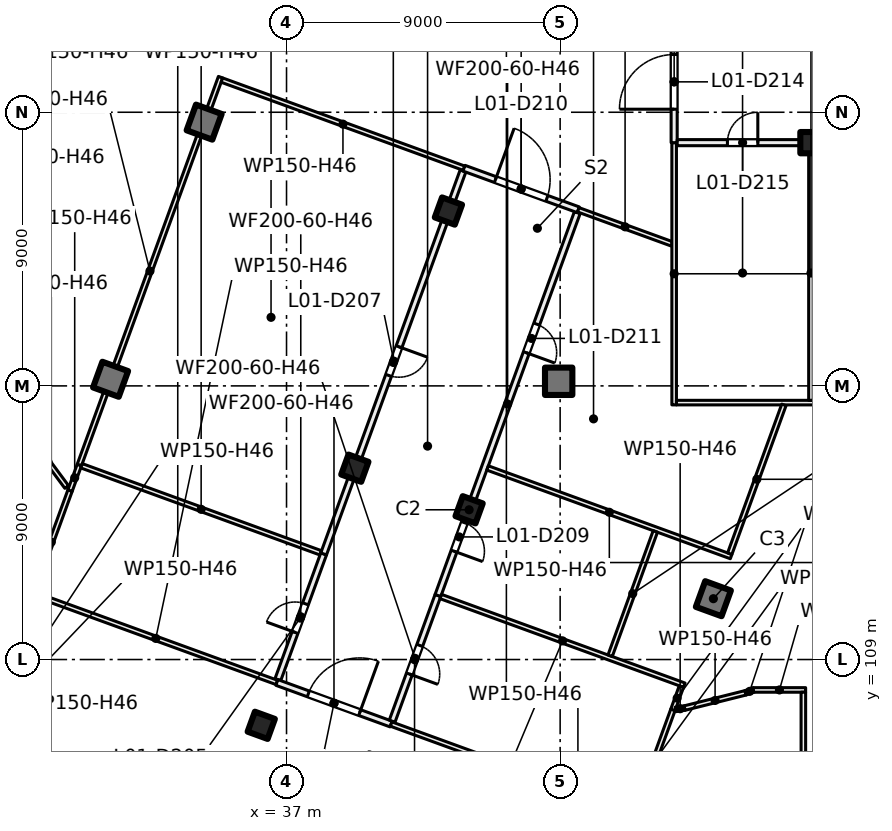
"""IFC4 building model, lengths in metres.
Left out: names, types, materials, properties, quantities, classifications, styles, units other than length and angle.
Written with IfcOpenShell. Run it as: python <this file> out.ifc"""

import sys

from ifc_helpers import new_model, si_unit, direction, frame, frame_2d, origin, origin_2d, place, context, subcontext, project, spatial, rectangle, extrude, element, fill, save


model = new_model("IFC4")
c1 = context("Model", 3, precision=1e-05, world=origin(), true_north=direction((0.0, 1.0)))
c2 = subcontext(c1, "Body", "Model", "MODEL_VIEW")
j1 = project(units=[si_unit("LENGTHUNIT", "METRE"), si_unit("PLANEANGLEUNIT", "RADIAN")], contexts=[c1])
p1 = place(None, origin())
s1 = spatial("IfcSite", under=j1, at=p1, CompositionType="ELEMENT")
p2 = place(p1, origin())
s2 = spatial("IfcBuilding", under=s1, at=p2, CompositionType="ELEMENT")
p3 = place(p2, frame((0.0, 0.0, 7.5)))
s3 = spatial("IfcBuildingStorey", under=s2, at=p3, CompositionType="ELEMENT", Elevation=7.5)
p4 = place(p3, frame((54.25, 126.0, 0.0), z_axis=(0.0, 0.0, 1.0), x_axis=(1.0, 0.0, 0.0)))
e1 = element("IfcColumn", 1, at=p4, inside=s3, PredefinedType="COLUMN", context=c2, shape_type="SweptSolid", body=[
    extrude(rectangle(XDim=0.7, YDim=0.7, at=origin_2d()), origin(), (0.0, 0.0, 1.0), 5.0),
])
p5 = place(p3, frame((45.952, 118.152, 0.0), z_axis=(0.0, 0.0, 1.0), x_axis=(1.0, 0.0, 0.0)))
e2 = element("IfcColumn", 2, at=p5, inside=s3, PredefinedType="COLUMN", context=c2, shape_type="SweptSolid", body=[
    extrude(rectangle(XDim=0.9, YDim=0.9, at=origin_2d()), origin(), (0.0, 0.0, 1.0), 5.0),
])
for number, where, z_axis, x_axis in (
    (3, (43.006, 113.925, 0.0), (0.0, 0.0, 1.0), (-0.342, -0.94, 0.0)),
    (4, (42.325, 123.751, 0.0), (0.0, 0.0, 1.0), (-0.342, -0.94, 0.0)),
    (5, (39.247, 115.293, 0.0), (0.0, 0.0, 1.0), (-0.342, -0.94, 0.0)),
    (6, (36.169, 106.836, 0.0), (0.0, 0.0, 1.0), (-0.342, -0.94, 0.0)),
):
    element("IfcColumn", number, at=place(p3, frame(where, z_axis=z_axis, x_axis=x_axis)), inside=s3, PredefinedType="COLUMN", context=c2, shape_type="SweptSolid", body=[
        extrude(rectangle(XDim=0.7, YDim=0.7, at=origin_2d()), origin(), (0.0, 0.0, 1.0), 5.0),
    ])
for number, where, z_axis, x_axis in (
    (7, (51.04, 111.001, 0.0), (0.0, 0.0, 1.0), (-0.342, -0.94, 0.0)),
    (8, (34.291, 126.675, 0.0), (0.0, 0.0, 1.0), (-0.342, -0.94, 0.0)),
    (9, (31.212, 118.218, 0.0), (0.0, 0.0, 1.0), (-0.342, -0.94, 0.0)),
):
    element("IfcColumn", number, at=place(p3, frame(where, z_axis=z_axis, x_axis=x_axis)), inside=s3, PredefinedType="COLUMN", context=c2, shape_type="SweptSolid", body=[
        extrude(rectangle(XDim=0.9, YDim=0.9, at=origin_2d()), origin(), (0.0, 0.0, 1.0), 5.0),
    ])
p6 = place(p2, origin())
s4 = spatial("IfcBuildingStorey", under=s2, at=p6, CompositionType="ELEMENT", Elevation=0.0)
p7 = place(p6, frame((54.0, 94.428, 0.0), z_axis=(0.0, 0.0, 1.0), x_axis=(0.342028064794, 0.939689737569, 0.0)))
e10 = element("IfcWall", 10, at=p7, inside=s4, PredefinedType="PARTITIONING", context=c2, shape_type="SweptSolid", body=[
    extrude(rectangle(XDim=14.443, YDim=0.3, at=frame_2d((7.222, 0.0))), origin(), (0.0, 0.0, 1.0), 11.1),
])
p8 = place(p3, frame((28.537, 116.336, 0.0), z_axis=(0.0, 0.0, 1.0), x_axis=(0.595741297031, -0.80317638599, 0.0)))
e11 = element("IfcWall", 11, at=p8, inside=s3, PredefinedType="PARTITIONING", context=c2, shape_type="SweptSolid", body=[
    extrude(rectangle(XDim=2.068, YDim=0.15, at=frame_2d((1.034, 0.0))), origin(), (0.0, 0.0, 1.0), 4.6),
])
p9 = place(p3, frame((28.647, 111.17, 0.0), z_axis=(0.0, 0.0, 1.0), x_axis=(0.341993373756, 0.939702363681, 0.0)))
e12 = element("IfcWall", 12, at=p9, inside=s3, PredefinedType="PARTITIONING", context=c2, shape_type="SweptSolid", body=[
    extrude(rectangle(XDim=3.602, YDim=0.15, at=frame_2d((1.801, 0.0))), origin(), (0.0, 0.0, 1.0), 4.6),
])
p10 = place(p3, frame((28.717, 111.144, 0.0), z_axis=(0.0, 0.0, 1.0), x_axis=(0.939731172492, -0.341914204803, 0.0)))
e13 = element("IfcWall", 13, at=p10, inside=s3, PredefinedType="PARTITIONING", context=c2, shape_type="SweptSolid", body=[
    extrude(rectangle(XDim=8.476, YDim=0.15, at=frame_2d((4.238, 0.0))), origin(), (0.0, 0.0, 1.0), 4.6),
])
p11 = place(p3, frame((29.879, 114.555, 0.0), z_axis=(0.0, 0.0, 1.0), x_axis=(0.341961311006, 0.939714031914, 0.0)))
e14 = element("IfcWall", 14, at=p11, inside=s3, PredefinedType="PARTITIONING", context=c2, shape_type="SweptSolid", body=[
    extrude(rectangle(XDim=0.898, YDim=0.15, at=frame_2d((0.449, 0.0))), origin(), (0.0, 0.0, 1.0), 4.6),
])
p12 = place(p3, frame((30.186, 115.399, 0.0), z_axis=(0.0, 0.0, 1.0), x_axis=(0.342121388632, 0.939655764331, 0.0)))
e15 = element("IfcWall", 15, at=p12, inside=s3, PredefinedType="PARTITIONING", context=c2, shape_type="SweptSolid", body=[
    extrude(rectangle(XDim=13.574, YDim=0.15, at=frame_2d((6.787, 0.0))), origin(), (0.0, 0.0, 1.0), 4.6),
])
p13 = place(p3, frame((30.256, 115.373, 0.0), z_axis=(0.0, 0.0, 1.0), x_axis=(0.939683593483, -0.342044944618, 0.0)))
e16 = element("IfcWall", 16, at=p13, inside=s3, PredefinedType="PARTITIONING", context=c2, shape_type="SweptSolid", body=[
    extrude(rectangle(XDim=8.376, YDim=0.15, at=frame_2d((4.188, 0.0))), origin(), (0.0, 0.0, 1.0), 4.6),
])
p14 = place(p3, frame((34.874, 128.058, 0.0), z_axis=(0.0, 0.0, 1.0), x_axis=(0.939708443164, -0.341976668571, 0.0)))
e17 = element("IfcWall", 17, at=p14, inside=s3, PredefinedType="PARTITIONING", context=c2, shape_type="SweptSolid", body=[
    extrude(rectangle(XDim=8.475, YDim=0.15, at=frame_2d((4.237, 0.0))), origin(), (0.0, 0.0, 1.0), 4.6),
])
p15 = place(p3, frame((36.716, 108.34, 0.0), z_axis=(0.0, 0.0, 1.0), x_axis=(0.342063854115, 0.939676710208, 0.0)))
e18 = element("IfcWall", 18, at=p15, inside=s3, PredefinedType="PARTITIONING", context=c2, shape_type="SweptSolid", body=[
    extrude(rectangle(XDim=4.399, YDim=0.2, at=frame_2d((2.2, 0.0))), origin(), (0.0, 0.0, 1.0), 4.6),
])
p16 = place(p15, frame((1.652, 0.0, 0.0)))
e19 = element("IfcOpeningElement", 19, at=p16, cuts=e18, PredefinedType="OPENING", context=c2, shape_type="SweptSolid", body=[
    extrude(rectangle(XDim=1.0, YDim=2.1, at=frame_2d((0.5, 1.05))), frame((0.0, 0.11, 0.0), z_axis=(0.0, -1.0, 0.0), x_axis=(1.0, 0.0, 0.0)), (0.0, 0.0, 1.0), 0.22),
])
p17 = place(p3, frame((40.44, 106.878, 0.0), z_axis=(0.0, 0.0, 1.0), x_axis=(-0.939665029144, 0.342095941228, 0.0)))
e20 = element("IfcWall", 20, at=p17, inside=s3, PredefinedType="PARTITIONING", context=c2, shape_type="SweptSolid", body=[
    extrude(rectangle(XDim=3.999, YDim=0.2, at=frame_2d((2.0, 0.0))), origin(), (0.0, 0.0, 1.0), 4.6),
])
p18 = place(p17, frame((1.099, 0.0, 0.0)))
e21 = element("IfcOpeningElement", 21, at=p18, cuts=e20, PredefinedType="OPENING", context=c2, shape_type="SweptSolid", body=[
    extrude(rectangle(XDim=1.8, YDim=2.1, at=frame_2d((0.9, 1.05))), frame((0.0, 0.11, 0.0), z_axis=(0.0, -1.0, 0.0), x_axis=(1.0, 0.0, 0.0)), (0.0, 0.0, 1.0), 0.22),
])
p19 = place(p3, frame((38.221, 112.474, 0.0), z_axis=(0.0, 0.0, 1.0), x_axis=(0.342018071111, 0.939693375008, 0.0)))
e22 = element("IfcWall", 22, at=p19, inside=s3, PredefinedType="PARTITIONING", context=c2, shape_type="SweptSolid", body=[
    extrude(rectangle(XDim=13.4, YDim=0.2, at=frame_2d((6.7, 0.0))), origin(), (0.0, 0.0, 1.0), 4.6),
])
p20 = place(p19, frame((6.248, 0.0, 0.0)))
e23 = element("IfcOpeningElement", 23, at=p20, cuts=e22, PredefinedType="OPENING", context=c2, shape_type="SweptSolid", body=[
    extrude(rectangle(XDim=1.0, YDim=2.1, at=frame_2d((0.5, 1.05))), frame((0.0, 0.11, 0.0), z_axis=(0.0, -1.0, 0.0), x_axis=(1.0, 0.0, 0.0)), (0.0, 0.0, 1.0), 0.22),
])
p21 = place(p3, frame((41.98, 111.106, 0.0), z_axis=(0.0, 0.0, 1.0), x_axis=(-0.342259834227, -0.93960534581, 0.0)))
e24 = element("IfcWall", 24, at=p21, inside=s3, PredefinedType="PARTITIONING", context=c2, shape_type="SweptSolid", body=[
    extrude(rectangle(XDim=4.4, YDim=0.2, at=frame_2d((2.2, 0.0))), origin(), (0.0, 0.0, 1.0), 4.6),
])
p22 = place(p21, frame((1.748, 0.0, 0.0)))
e25 = element("IfcOpeningElement", 25, at=p22, cuts=e24, PredefinedType="OPENING", context=c2, shape_type="SweptSolid", body=[
    extrude(rectangle(XDim=1.0, YDim=2.1, at=frame_2d((0.5, 1.05))), frame((0.0, 0.11, 0.0), z_axis=(0.0, -1.0, 0.0), x_axis=(1.0, 0.0, 0.0)), (0.0, 0.0, 1.0), 0.22),
])
p23 = place(p3, frame((40.44, 106.878, 0.0), z_axis=(0.0, 0.0, 1.0), x_axis=(0.939697516706, -0.342006691597, 0.0)))
e26 = element("IfcWall", 26, at=p23, inside=s3, PredefinedType="PARTITIONING", context=c2, shape_type="SweptSolid", body=[
    extrude(rectangle(XDim=8.476, YDim=0.15, at=frame_2d((4.238, 0.0))), origin(), (0.0, 0.0, 1.0), 4.6),
])
p24 = place(p3, frame((46.563, 123.698, 0.0), z_axis=(0.0, 0.0, 1.0), x_axis=(-0.342012215574, -0.939695506214, 0.0)))
e27 = element("IfcWall", 27, at=p24, inside=s3, PredefinedType="PARTITIONING", context=c2, shape_type="SweptSolid", body=[
    extrude(rectangle(XDim=13.4, YDim=0.2, at=frame_2d((6.7, 0.0))), origin(), (0.0, 0.0, 1.0), 4.6),
])
p25 = place(p24, frame((10.85, 0.0, 0.0)))
e28 = element("IfcOpeningElement", 28, at=p25, cuts=e27, PredefinedType="OPENING", context=c2, shape_type="SweptSolid", body=[
    extrude(rectangle(XDim=1.0, YDim=2.1, at=frame_2d((0.5, 1.05))), frame((0.0, 0.11, 0.0), z_axis=(0.0, -1.0, 0.0), x_axis=(1.0, 0.0, 0.0)), (0.0, 0.0, 1.0), 0.22),
])
p26 = place(p24, frame((3.902, 0.0, 0.0)))
e29 = element("IfcOpeningElement", 29, at=p26, cuts=e27, PredefinedType="OPENING", context=c2, shape_type="SweptSolid", body=[
    extrude(rectangle(XDim=1.0, YDim=2.1, at=frame_2d((0.5, 1.05))), frame((0.0, 0.11, 0.0), z_axis=(0.0, -1.0, 0.0), x_axis=(1.0, 0.0, 0.0)), (0.0, 0.0, 1.0), 0.22),
])
p27 = place(p3, frame((42.074, 111.072, 0.0), z_axis=(0.0, 0.0, 1.0), x_axis=(0.939669601, -0.342083383046, 0.0)))
e30 = element("IfcWall", 30, at=p27, inside=s3, PredefinedType="PARTITIONING", context=c2, shape_type="SweptSolid", body=[
    extrude(rectangle(XDim=8.524, YDim=0.15, at=frame_2d((4.262, 0.0))), origin(), (0.0, 0.0, 1.0), 4.6),
])
p28 = place(p3, frame((42.838, 125.16, 0.0), z_axis=(0.0, 0.0, 1.0), x_axis=(0.939713209288, -0.341963571582, 0.0)))
e31 = element("IfcWall", 31, at=p28, inside=s3, PredefinedType="PARTITIONING", context=c2, shape_type="SweptSolid", body=[
    extrude(rectangle(XDim=4.0, YDim=0.2, at=frame_2d((2.0, 0.0))), origin(), (0.0, 0.0, 1.0), 4.6),
])
p29 = place(p28, frame((1.1, 0.0, 0.0)))
e32 = element("IfcOpeningElement", 32, at=p29, cuts=e31, PredefinedType="OPENING", context=c2, shape_type="SweptSolid", body=[
    extrude(rectangle(XDim=1.8, YDim=2.1, at=frame_2d((0.9, 1.05))), frame((0.0, 0.11, 0.0), z_axis=(0.0, -1.0, 0.0), x_axis=(1.0, 0.0, 0.0)), (0.0, 0.0, 1.0), 0.22),
])
p30 = place(p3, frame((43.613, 115.301, 0.0), z_axis=(0.0, 0.0, 1.0), x_axis=(0.939669601, -0.342083383046, 0.0)))
e33 = element("IfcWall", 33, at=p30, inside=s3, PredefinedType="PARTITIONING", context=c2, shape_type="SweptSolid", body=[
    extrude(rectangle(XDim=8.524, YDim=0.15, at=frame_2d((4.262, 0.0))), origin(), (0.0, 0.0, 1.0), 4.6),
])
p31 = place(p3, frame((46.597, 123.792, 0.0), z_axis=(0.0, 0.0, 1.0), x_axis=(0.939619227089, -0.342221723572, 0.0)))
e34 = element("IfcWall", 34, at=p31, inside=s3, PredefinedType="PARTITIONING", context=c2, shape_type="SweptSolid", body=[
    extrude(rectangle(XDim=3.276, YDim=0.15, at=frame_2d((1.638, 0.0))), origin(), (0.0, 0.0, 1.0), 4.6),
])
p32 = place(p3, frame((47.644, 109.124, 0.0), z_axis=(0.0, 0.0, 1.0), x_axis=(0.341783611499, 0.939778677621, 0.0)))
e35 = element("IfcWall", 35, at=p32, inside=s3, PredefinedType="PARTITIONING", context=c2, shape_type="SweptSolid", body=[
    extrude(rectangle(XDim=4.351, YDim=0.15, at=frame_2d((2.175, 0.0))), origin(), (0.0, 0.0, 1.0), 4.6),
])
p33 = place(p3, frame((48.475, 103.953, 0.0), z_axis=(0.0, 0.0, 1.0), x_axis=(0.341992779494, 0.939702579955, 0.0)))
e36 = element("IfcWall", 36, at=p33, inside=s3, PredefinedType="PARTITIONING", context=c2, shape_type="SweptSolid", body=[
    extrude(rectangle(XDim=3.611, YDim=0.15, at=frame_2d((1.805, 0.0))), origin(), (0.0, 0.0, 1.0), 4.6),
])
p34 = place(p3, frame((49.71, 107.346, 0.0), z_axis=(0.0, 0.0, 1.0), x_axis=(0.341189816469, 0.939994419737, 0.0)))
e37 = element("IfcWall", 37, at=p34, inside=s3, PredefinedType="PARTITIONING", context=c2, shape_type="SweptSolid", body=[
    extrude(rectangle(XDim=0.815, YDim=0.15, at=frame_2d((0.407, 0.0))), origin(), (0.0, 0.0, 1.0), 4.6),
])
p35 = place(p3, frame((49.794, 107.359, 0.0), z_axis=(0.0, 0.0, 1.0), x_axis=(0.988901730308, 0.148571086668, 0.0)))
e38 = element("IfcWall", 38, at=p35, inside=s3, PredefinedType="PARTITIONING", context=c2, shape_type="SweptSolid", body=[
    extrude(rectangle(XDim=0.311, YDim=0.15, at=frame_2d((0.155, 0.0))), origin(), (0.0, 0.0, 1.0), 4.6),
])
p36 = place(p3, frame((49.75, 117.375, 0.0), z_axis=(0.0, 0.0, 1.0), x_axis=(0.0, 1.0, 0.0)))
e39 = element("IfcWall", 39, at=p36, inside=s3, PredefinedType="PARTITIONING", context=c2, shape_type="SweptSolid", body=[
    extrude(rectangle(XDim=8.625, YDim=0.15, at=frame_2d((4.312, 0.0))), origin(), (0.0, 0.0, 1.0), 4.6),
])
p37 = place(p3, frame((91.0, 117.45, 0.0), z_axis=(0.0, 0.0, 1.0), x_axis=(-1.0, 0.0, 0.0)))
e40 = element("IfcWall", 40, at=p37, inside=s3, PredefinedType="PARTITIONING", context=c2, shape_type="SweptSolid", body=[
    extrude(rectangle(XDim=41.175, YDim=0.15, at=frame_2d((20.587, 0.0))), origin(), (0.0, 0.0, 1.0), 4.6),
])
p38 = place(p37, frame((11.5, 0.0, 0.0)))
e41 = element("IfcOpeningElement", 41, at=p38, cuts=e40, PredefinedType="OPENING", context=c2, shape_type="SweptSolid", body=[
    extrude(rectangle(XDim=1.0, YDim=2.1, at=frame_2d((0.5, 1.05))), frame((0.0, 0.085, 0.0), z_axis=(0.0, -1.0, 0.0), x_axis=(1.0, 0.0, 0.0)), (0.0, 0.0, 1.0), 0.17),
])
p39 = place(p3, frame((49.75, 126.0, 0.0), z_axis=(0.0, 0.0, 1.0), x_axis=(0.0, 1.0, 0.0)))
e42 = element("IfcWall", 42, at=p39, inside=s3, PredefinedType="PARTITIONING", context=c2, shape_type="SweptSolid", body=[
    extrude(rectangle(XDim=4.0, YDim=0.2, at=frame_2d((2.0, 0.0))), origin(), (0.0, 0.0, 1.0), 4.6),
])
p40 = place(p39, frame((1.1, 0.0, 0.0)))
e43 = element("IfcOpeningElement", 43, at=p40, cuts=e42, PredefinedType="OPENING", context=c2, shape_type="SweptSolid", body=[
    extrude(rectangle(XDim=1.8, YDim=2.1, at=frame_2d((0.9, 1.05))), frame((0.0, 0.11, 0.0), z_axis=(0.0, -1.0, 0.0), x_axis=(1.0, 0.0, 0.0)), (0.0, 0.0, 1.0), 0.22),
])
p41 = place(p3, frame((67.65, 126.0, 0.0), z_axis=(0.0, 0.0, 1.0), x_axis=(-1.0, 0.0, 0.0)))
e44 = element("IfcWall", 44, at=p41, inside=s3, PredefinedType="PARTITIONING", context=c2, shape_type="SweptSolid", body=[
    extrude(rectangle(XDim=17.8, YDim=0.2, at=frame_2d((8.9, 0.0))), origin(), (0.0, 0.0, 1.0), 4.6),
])
p42 = place(p41, frame((15.148, 0.0, 0.0)))
e45 = element("IfcOpeningElement", 45, at=p42, cuts=e44, PredefinedType="OPENING", context=c2, shape_type="SweptSolid", body=[
    extrude(rectangle(XDim=1.0, YDim=2.1, at=frame_2d((0.5, 1.05))), frame((0.0, 0.11, 0.0), z_axis=(0.0, -1.0, 0.0), x_axis=(1.0, 0.0, 0.0)), (0.0, 0.0, 1.0), 0.22),
])
p43 = place(p41, frame((10.65, 0.0, 0.0)))
e46 = element("IfcOpeningElement", 46, at=p43, cuts=e44, PredefinedType="OPENING", context=c2, shape_type="SweptSolid", body=[
    extrude(rectangle(XDim=1.0, YDim=2.1, at=frame_2d((0.5, 1.05))), frame((0.0, 0.11, 0.0), z_axis=(0.0, -1.0, 0.0), x_axis=(1.0, 0.0, 0.0)), (0.0, 0.0, 1.0), 0.22),
])
p44 = place(p41, frame((3.002, 0.0, 0.0)))
e47 = element("IfcOpeningElement", 47, at=p44, cuts=e44, PredefinedType="OPENING", context=c2, shape_type="SweptSolid", body=[
    extrude(rectangle(XDim=1.0, YDim=2.1, at=frame_2d((0.5, 1.05))), frame((0.0, 0.11, 0.0), z_axis=(0.0, -1.0, 0.0), x_axis=(1.0, 0.0, 0.0)), (0.0, 0.0, 1.0), 0.22),
])
p45 = place(p3, frame((50.093, 107.403, 0.0), z_axis=(0.0, 0.0, 1.0), x_axis=(0.970121672102, 0.24261892201, 0.0)))
e48 = element("IfcWall", 48, at=p45, inside=s3, PredefinedType="PARTITIONING", context=c2, shape_type="SweptSolid", body=[
    extrude(rectangle(XDim=2.069, YDim=0.15, at=frame_2d((1.034, 0.0))), origin(), (0.0, 0.0, 1.0), 4.6),
])
p46 = place(p3, frame((51.579, 112.481, 0.0), z_axis=(0.0, 0.0, 1.0), x_axis=(0.341972650852, 0.939709905274, 0.0)))
e49 = element("IfcWall", 49, at=p46, inside=s3, PredefinedType="PARTITIONING", context=c2, shape_type="SweptSolid", body=[
    extrude(rectangle(XDim=5.208, YDim=0.15, at=frame_2d((2.604, 0.0))), origin(), (0.0, 0.0, 1.0), 4.6),
])
p47 = place(p3, frame((52.093, 107.903, 0.0), z_axis=(0.0, 0.0, 1.0), x_axis=(0.941980718737, 0.335666986056, 0.0)))
e50 = element("IfcWall", 50, at=p47, inside=s3, PredefinedType="PARTITIONING", context=c2, shape_type="SweptSolid", body=[
    extrude(rectangle(XDim=0.3, YDim=0.15, at=frame_2d((0.15, 0.0))), origin(), (0.0, 0.0, 1.0), 4.6),
])
p48 = place(p3, frame((52.351, 108.0, 0.0), z_axis=(0.0, 0.0, 1.0), x_axis=(1.0, 0.0, 0.0)))
e51 = element("IfcWall", 51, at=p48, inside=s3, PredefinedType="PARTITIONING", context=c2, shape_type="SweptSolid", body=[
    extrude(rectangle(XDim=1.724, YDim=0.15, at=frame_2d((0.862, 0.0))), origin(), (0.0, 0.0, 1.0), 4.6),
])
p49 = place(p3, frame((54.0, 94.428, 0.0), z_axis=(0.0, 0.0, 1.0), x_axis=(0.0, 1.0, 0.0)))
e52 = element("IfcWall", 52, at=p49, inside=s3, PredefinedType="PARTITIONING", context=c2, shape_type="SweptSolid", body=[
    extrude(rectangle(XDim=13.497, YDim=0.15, at=frame_2d((6.749, 0.0))), origin(), (0.0, 0.0, 1.0), 3.6),
])
p50 = place(p3, frame((54.25, 117.525, 0.0), z_axis=(0.0, 0.0, 1.0), x_axis=(0.0, 1.0, 0.0)))
e53 = element("IfcWall", 53, at=p50, inside=s3, PredefinedType="PARTITIONING", context=c2, shape_type="SweptSolid", body=[
    extrude(rectangle(XDim=8.375, YDim=0.15, at=frame_2d((4.188, 0.0))), origin(), (0.0, 0.0, 1.0), 4.6),
])
p51 = place(p16, origin())
e54 = element("IfcDoor", 54, at=p51, inside=s3, OperationType="SINGLE_SWING_LEFT", PredefinedType="DOOR", context=c2, shape_type="SweptSolid", body=[
    extrude(rectangle(XDim=1.0, YDim=2.1, at=frame_2d((0.5, 1.05))), frame((0.0, 0.025, 0.0), z_axis=(0.0, -1.0, 0.0), x_axis=(1.0, 0.0, 0.0)), (0.0, 0.0, 1.0), 0.05),
])
fill(e19, e54)
p52 = place(p18, origin())
e55 = element("IfcDoor", 55, at=p52, inside=s3, OperationType="DOUBLE_DOOR_SINGLE_SWING", PredefinedType="DOOR", context=c2, shape_type="SweptSolid", body=[
    extrude(rectangle(XDim=1.8, YDim=2.1, at=frame_2d((0.9, 1.05))), frame((0.0, 0.025, 0.0), z_axis=(0.0, -1.0, 0.0), x_axis=(1.0, 0.0, 0.0)), (0.0, 0.0, 1.0), 0.05),
])
fill(e21, e55)
p53 = place(p20, origin())
e56 = element("IfcDoor", 56, at=p53, inside=s3, OperationType="SINGLE_SWING_RIGHT", PredefinedType="DOOR", context=c2, shape_type="SweptSolid", body=[
    extrude(rectangle(XDim=1.0, YDim=2.1, at=frame_2d((0.5, 1.05))), frame((0.0, 0.025, 0.0), z_axis=(0.0, -1.0, 0.0), x_axis=(1.0, 0.0, 0.0)), (0.0, 0.0, 1.0), 0.05),
])
fill(e23, e56)
p54 = place(p22, origin())
e57 = element("IfcDoor", 57, at=p54, inside=s3, OperationType="SINGLE_SWING_RIGHT", PredefinedType="DOOR", context=c2, shape_type="SweptSolid", body=[
    extrude(rectangle(XDim=1.0, YDim=2.1, at=frame_2d((0.5, 1.05))), frame((0.0, 0.025, 0.0), z_axis=(0.0, -1.0, 0.0), x_axis=(1.0, 0.0, 0.0)), (0.0, 0.0, 1.0), 0.05),
])
fill(e25, e57)
p55 = place(p25, origin())
e58 = element("IfcDoor", 58, at=p55, inside=s3, OperationType="SINGLE_SWING_RIGHT", PredefinedType="DOOR", context=c2, shape_type="SweptSolid", body=[
    extrude(rectangle(XDim=1.0, YDim=2.1, at=frame_2d((0.5, 1.05))), frame((0.0, 0.025, 0.0), z_axis=(0.0, -1.0, 0.0), x_axis=(1.0, 0.0, 0.0)), (0.0, 0.0, 1.0), 0.05),
])
fill(e28, e58)
p56 = place(p29, origin())
e59 = element("IfcDoor", 59, at=p56, inside=s3, OperationType="DOUBLE_DOOR_SINGLE_SWING", PredefinedType="DOOR", context=c2, shape_type="SweptSolid", body=[
    extrude(rectangle(XDim=1.8, YDim=2.1, at=frame_2d((0.9, 1.05))), frame((0.0, 0.025, 0.0), z_axis=(0.0, -1.0, 0.0), x_axis=(1.0, 0.0, 0.0)), (0.0, 0.0, 1.0), 0.05),
])
fill(e32, e59)
p57 = place(p26, origin())
e60 = element("IfcDoor", 60, at=p57, inside=s3, OperationType="SINGLE_SWING_RIGHT", PredefinedType="DOOR", context=c2, shape_type="SweptSolid", body=[
    extrude(rectangle(XDim=1.0, YDim=2.1, at=frame_2d((0.5, 1.05))), frame((0.0, 0.025, 0.0), z_axis=(0.0, -1.0, 0.0), x_axis=(1.0, 0.0, 0.0)), (0.0, 0.0, 1.0), 0.05),
])
fill(e29, e60)
p58 = place(p40, origin())
e61 = element("IfcDoor", 61, at=p58, inside=s3, OperationType="DOUBLE_DOOR_SINGLE_SWING", PredefinedType="DOOR", context=c2, shape_type="SweptSolid", body=[
    extrude(rectangle(XDim=1.8, YDim=2.1, at=frame_2d((0.9, 1.05))), frame((0.0, 0.025, 0.0), z_axis=(0.0, -1.0, 0.0), x_axis=(1.0, 0.0, 0.0)), (0.0, 0.0, 1.0), 0.05),
])
fill(e43, e61)
p59 = place(p42, origin())
e62 = element("IfcDoor", 62, at=p59, inside=s3, OperationType="SINGLE_SWING_LEFT", PredefinedType="DOOR", context=c2, shape_type="SweptSolid", body=[
    extrude(rectangle(XDim=1.0, YDim=2.1, at=frame_2d((0.5, 1.05))), frame((0.0, 0.025, 0.0), z_axis=(0.0, -1.0, 0.0), x_axis=(1.0, 0.0, 0.0)), (0.0, 0.0, 1.0), 0.05),
])
fill(e45, e62)
save(model, sys.argv[1])
